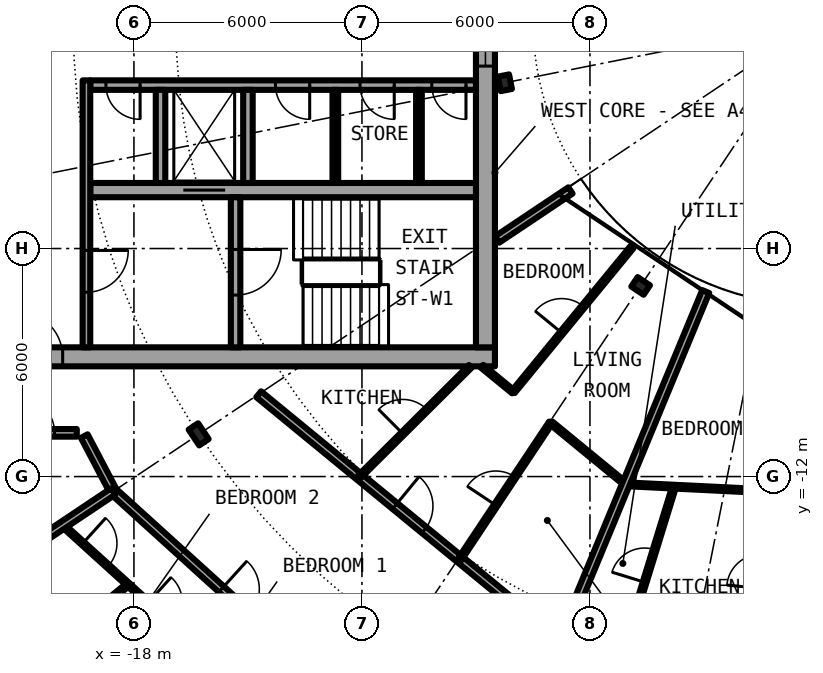
"""IFC4 building model, lengths in metres.
Left out: names, types, materials, properties, quantities, classifications, styles, units other than length and angle.
Written with IfcOpenShell. Run it as: python <this file> out.ifc"""

import sys

from ifc_helpers import new_model, si_unit, direction, frame, frame_2d, origin, origin_2d, place, context, subcontext, project, spatial, rectangle, i_section, extrude, element, fill, save


model = new_model("IFC4")
c1 = context("Model", 3, precision=1e-05, world=origin(), true_north=direction((0.0, 1.0)))
c2 = subcontext(c1, "Body", "Model", "MODEL_VIEW")
j1 = project(units=[si_unit("LENGTHUNIT", "METRE"), si_unit("PLANEANGLEUNIT", "RADIAN")], contexts=[c1])
p1 = place(None, origin())
s1 = spatial("IfcSite", under=j1, at=p1, CompositionType="ELEMENT")
p2 = place(p1, origin())
s2 = spatial("IfcBuilding", under=s1, at=p2, CompositionType="ELEMENT")
p3 = place(p2, frame((0.0, 0.0, 151.3)))
s3 = spatial("IfcBuildingStorey", under=s2, at=p3, CompositionType="ELEMENT", Elevation=151.3)
p4 = place(p3, frame((-16.297, -10.889, 0.0), z_axis=(0.0, 0.0, 1.0), x_axis=(-0.831469612303, -0.55557023302, 0.0)))
e1 = element("IfcColumn", 1, at=p4, inside=s3, PredefinedType="COLUMN", context=c2, shape_type="SweptSolid", body=[
    extrude(i_section(OverallWidth=0.3, OverallDepth=0.5, WebThickness=0.014, FlangeThickness=0.028, FilletRadius=0.027, at=origin_2d()), origin(), (0.0, 0.0, 1.0), 3.05),
])
for number, where, z_axis, x_axis in (
    (2, (-8.239, -1.639, 0.0), (0.0, 0.0, 1.0), (-0.981, -0.195, 0.0)),
    (3, (-4.667, -6.984, 0.0), (0.0, 0.0, 1.0), (-0.556, -0.831, 0.0)),
):
    element("IfcColumn", number, at=place(p3, frame(where, z_axis=z_axis, x_axis=x_axis)), inside=s3, PredefinedType="COLUMN", context=c2, shape_type="SweptSolid", body=[
        extrude(i_section(OverallWidth=0.3, OverallDepth=0.39, WebThickness=0.011, FlangeThickness=0.019, FilletRadius=0.027, at=origin_2d()), origin(), (0.0, 0.0, 1.0), 3.05),
    ])
p5 = place(p3, frame((-22.1, -8.85, 0.0), z_axis=(0.0, 0.0, 1.0), x_axis=(1.0, 0.0, 0.0)))
e4 = element("IfcWall", 4, at=p5, inside=s3, PredefinedType="SHEAR", context=c2, shape_type="SweptSolid", body=[
    extrude(rectangle(XDim=13.6, YDim=0.5, at=frame_2d((6.8, 0.0))), origin(), (0.0, 0.0, 1.0), 3.05),
])
p6 = place(p5, frame((1.025, 0.0, 0.0)))
e5 = element("IfcOpeningElement", 5, at=p6, cuts=e4, PredefinedType="OPENING", context=c2, shape_type="SweptSolid", body=[
    extrude(rectangle(XDim=1.2, YDim=2.3, at=frame_2d((0.6, 1.15))), frame((0.0, 0.26, 0.0), z_axis=(0.0, -1.0, 0.0), x_axis=(1.0, 0.0, 0.0)), (0.0, 0.0, 1.0), 0.52),
])
p7 = place(p3, frame((-8.75, 8.6, 0.0), z_axis=(0.0, 0.0, 1.0), x_axis=(0.0, -1.0, 0.0)))
e6 = element("IfcWall", 6, at=p7, inside=s3, PredefinedType="SHEAR", context=c2, shape_type="SweptSolid", body=[
    extrude(rectangle(XDim=17.2, YDim=0.5, at=frame_2d((8.6, 0.0))), origin(), (0.0, 0.0, 1.0), 3.05),
])
p8 = place(p7, frame((7.4, 0.0, 0.1)))
e7 = element("IfcOpeningElement", 7, at=p8, cuts=e6, PredefinedType="OPENING", context=c2, shape_type="SweptSolid", body=[
    extrude(rectangle(XDim=2.4, YDim=2.2, at=frame_2d((1.2, 1.1))), frame((0.0, 0.26, 0.0), z_axis=(0.0, -1.0, 0.0), x_axis=(1.0, 0.0, 0.0)), (0.0, 0.0, 1.0), 0.52),
])
p9 = place(p3, frame((-9.0, -1.7, 0.0), z_axis=(0.0, 0.0, 1.0), x_axis=(-1.0, 0.0, 0.0)))
e8 = element("IfcWall", 8, at=p9, inside=s3, PredefinedType="SHEAR", context=c2, shape_type="SweptSolid", body=[
    extrude(rectangle(XDim=10.15, YDim=0.25, at=frame_2d((5.075, 0.0))), origin(), (0.0, 0.0, 1.0), 3.05),
])
p10 = place(p9, frame((0.262, 0.0, 0.0)))
e9 = element("IfcOpeningElement", 9, at=p10, cuts=e8, PredefinedType="OPENING", context=c2, shape_type="SweptSolid", body=[
    extrude(rectangle(XDim=0.9, YDim=2.3, at=frame_2d((0.45, 1.15))), frame((0.0, 0.135, 0.0), z_axis=(0.0, -1.0, 0.0), x_axis=(1.0, 0.0, 0.0)), (0.0, 0.0, 1.0), 0.27),
])
p11 = place(p9, frame((2.15, 0.0, 0.0)))
e10 = element("IfcOpeningElement", 10, at=p11, cuts=e8, PredefinedType="OPENING", context=c2, shape_type="SweptSolid", body=[
    extrude(rectangle(XDim=0.9, YDim=2.3, at=frame_2d((0.45, 1.15))), frame((0.0, 0.135, 0.0), z_axis=(0.0, -1.0, 0.0), x_axis=(1.0, 0.0, 0.0)), (0.0, 0.0, 1.0), 0.27),
])
p12 = place(p9, frame((4.375, 0.0, 0.0)))
e11 = element("IfcOpeningElement", 11, at=p12, cuts=e8, PredefinedType="OPENING", context=c2, shape_type="SweptSolid", body=[
    extrude(rectangle(XDim=0.9, YDim=2.3, at=frame_2d((0.45, 1.15))), frame((0.0, 0.135, 0.0), z_axis=(0.0, -1.0, 0.0), x_axis=(1.0, 0.0, 0.0)), (0.0, 0.0, 1.0), 0.27),
])
p13 = place(p9, frame((8.837, 0.0, 0.0)))
e12 = element("IfcOpeningElement", 12, at=p13, cuts=e8, PredefinedType="OPENING", context=c2, shape_type="SweptSolid", body=[
    extrude(rectangle(XDim=0.9, YDim=2.3, at=frame_2d((0.45, 1.15))), frame((0.0, 0.135, 0.0), z_axis=(0.0, -1.0, 0.0), x_axis=(1.0, 0.0, 0.0)), (0.0, 0.0, 1.0), 0.27),
])
p14 = place(p3, frame((-9.0, -4.462, 0.0), z_axis=(0.0, 0.0, 1.0), x_axis=(-1.0, 0.0, 0.0)))
e13 = element("IfcWall", 13, at=p14, inside=s3, PredefinedType="SHEAR", context=c2, shape_type="SweptSolid", body=[
    extrude(rectangle(XDim=10.15, YDim=0.375, at=frame_2d((5.075, 0.0))), origin(), (0.0, 0.0, 1.0), 3.05),
])
p15 = place(p14, frame((6.6, 0.0, 0.0)))
e14 = element("IfcOpeningElement", 14, at=p15, cuts=e13, PredefinedType="OPENING", context=c2, shape_type="SweptSolid", body=[
    extrude(rectangle(XDim=1.1, YDim=2.3, at=frame_2d((0.55, 1.15))), frame((0.0, 0.198, 0.0), z_axis=(0.0, -1.0, 0.0), x_axis=(1.0, 0.0, 0.0)), (0.0, 0.0, 1.0), 0.395),
])
p16 = place(p3, frame((-15.325, -4.65, 0.0), z_axis=(0.0, 0.0, 1.0), x_axis=(0.0, -1.0, 0.0)))
e15 = element("IfcWall", 15, at=p16, inside=s3, PredefinedType="SHEAR", context=c2, shape_type="SweptSolid", body=[
    extrude(rectangle(XDim=3.95, YDim=0.25, at=frame_2d((1.975, 0.0))), origin(), (0.0, 0.0, 1.0), 3.05),
])
p17 = place(p16, frame((1.375, 0.0, 0.0)))
e16 = element("IfcOpeningElement", 16, at=p17, cuts=e15, PredefinedType="OPENING", context=c2, shape_type="SweptSolid", body=[
    extrude(rectangle(XDim=1.2, YDim=2.3, at=frame_2d((0.6, 1.15))), frame((0.0, 0.135, 0.0), z_axis=(0.0, -1.0, 0.0), x_axis=(1.0, 0.0, 0.0)), (0.0, 0.0, 1.0), 0.27),
])
for number, where, z_axis, x_axis in (
    (17, (-15.0, -1.825, 0.0), (0.0, 0.0, 1.0), (0.0, -1.0, 0.0)),
    (18, (-17.3, -1.825, 0.0), (0.0, 0.0, 1.0), (0.0, -1.0, 0.0)),
):
    element("IfcWall", number, at=place(p3, frame(where, z_axis=z_axis, x_axis=x_axis)), inside=s3, PredefinedType="SOLIDWALL", context=c2, shape_type="SweptSolid", body=[
        extrude(rectangle(XDim=2.45, YDim=0.25, at=frame_2d((1.225, 0.0))), origin(), (0.0, 0.0, 1.0), 2.7),
    ])
p18 = place(p3, frame((-19.25, -1.575, 0.0), z_axis=(0.0, 0.0, 1.0), x_axis=(0.0, -1.0, 0.0)))
e19 = element("IfcWall", 19, at=p18, inside=s3, PredefinedType="SOLIDWALL", context=c2, shape_type="SweptSolid", body=[
    extrude(rectangle(XDim=7.025, YDim=0.2, at=frame_2d((3.513, 0.0))), origin(), (0.0, 0.0, 1.0), 2.7),
])
p19 = place(p18, frame((4.475, 0.0, 0.0)))
e20 = element("IfcOpeningElement", 20, at=p19, cuts=e19, PredefinedType="OPENING", context=c2, shape_type="SweptSolid", body=[
    extrude(rectangle(XDim=1.1, YDim=2.3, at=frame_2d((0.55, 1.15))), frame((0.0, 0.11, 0.0), z_axis=(0.0, -1.0, 0.0), x_axis=(1.0, 0.0, 0.0)), (0.0, 0.0, 1.0), 0.22),
])
for number, where, z_axis, x_axis in (
    (21, (-10.5, -1.825, 0.0), (0.0, 0.0, 1.0), (0.0, -1.0, 0.0)),
    (22, (-12.7, -1.825, 0.0), (0.0, 0.0, 1.0), (0.0, -1.0, 0.0)),
):
    element("IfcWall", number, at=place(p3, frame(where, z_axis=z_axis, x_axis=x_axis)), inside=s3, PredefinedType="PARTITIONING", context=c2, shape_type="SweptSolid", body=[
        extrude(rectangle(XDim=2.45, YDim=0.15, at=frame_2d((1.225, 0.0))), origin(), (0.0, 0.0, 1.0), 2.7),
    ])
p20 = place(p3, frame((-19.869, -13.284, 0.0), z_axis=(0.0, 0.0, 1.0), x_axis=(0.741104058203, -0.67139018083, 0.0)))
e23 = element("IfcWall", 23, at=p20, inside=s3, PredefinedType="PARTITIONING", context=c2, shape_type="SweptSolid", body=[
    extrude(rectangle(XDim=6.969, YDim=0.1, at=frame_2d((3.484, 0.0))), origin(), (0.0, 0.0, 1.0), 2.7),
])
p21 = place(p20, frame((3.028, 0.0, 0.0)))
e24 = element("IfcOpeningElement", 24, at=p21, cuts=e23, PredefinedType="OPENING", context=c2, shape_type="SweptSolid", body=[
    extrude(rectangle(XDim=0.9, YDim=2.3, at=frame_2d((0.45, 1.15))), frame((0.0, 0.06, 0.0), z_axis=(0.0, -1.0, 0.0), x_axis=(1.0, 0.0, 0.0)), (0.0, 0.0, 1.0), 0.12),
])
p22 = place(p20, frame((0.705, 0.0, 0.0)))
e25 = element("IfcOpeningElement", 25, at=p22, cuts=e23, PredefinedType="OPENING", context=c2, shape_type="SweptSolid", body=[
    extrude(rectangle(XDim=0.9, YDim=2.3, at=frame_2d((0.45, 1.15))), frame((0.0, 0.06, 0.0), z_axis=(0.0, -1.0, 0.0), x_axis=(1.0, 0.0, 0.0)), (0.0, 0.0, 1.0), 0.12),
])
p23 = place(p3, frame((-19.307, -10.935, 0.0), z_axis=(0.0, 0.0, 1.0), x_axis=(0.465605550524, -0.884992356646, 0.0)))
e26 = element("IfcWall", 26, at=p23, inside=s3, PredefinedType="PARTITIONING", context=c2, shape_type="SweptSolid", body=[
    extrude(rectangle(XDim=1.643, YDim=0.2, at=frame_2d((0.821, 0.0))), origin(), (0.0, 0.0, 1.0), 2.7),
])
p24 = place(p3, frame((-18.542, -12.389, 0.0), z_axis=(0.0, 0.0, 1.0), x_axis=(0.740979597636, -0.671527539188, 0.0)))
e27 = element("IfcWall", 27, at=p24, inside=s3, PredefinedType="PARTITIONING", context=c2, shape_type="SweptSolid", body=[
    extrude(rectangle(XDim=10.841, YDim=0.2, at=frame_2d((5.42, 0.0))), origin(), (0.0, 0.0, 1.0), 2.7),
])
p25 = place(p24, frame((3.835, 0.0, 0.0)))
e28 = element("IfcOpeningElement", 28, at=p25, cuts=e27, PredefinedType="OPENING", context=c2, shape_type="SweptSolid", body=[
    extrude(rectangle(XDim=1.0, YDim=2.3, at=frame_2d((0.5, 1.15))), frame((0.0, 0.11, 0.0), z_axis=(0.0, -1.0, 0.0), x_axis=(1.0, 0.0, 0.0)), (0.0, 0.0, 1.0), 0.22),
])
p26 = place(p3, frame((-14.717, -9.834, 0.0), z_axis=(0.0, 0.0, 1.0), x_axis=(0.773034536097, -0.634363938131, 0.0)))
e29 = element("IfcWall", 29, at=p26, inside=s3, PredefinedType="PARTITIONING", context=c2, shape_type="SweptSolid", body=[
    extrude(rectangle(XDim=10.277, YDim=0.2, at=frame_2d((5.138, 0.0))), origin(), (0.0, 0.0, 1.0), 2.7),
])
p27 = place(p26, frame((4.638, 0.0, 0.0)))
e30 = element("IfcOpeningElement", 30, at=p27, cuts=e29, PredefinedType="OPENING", context=c2, shape_type="SweptSolid", body=[
    extrude(rectangle(XDim=1.0, YDim=2.3, at=frame_2d((0.5, 1.15))), frame((0.0, 0.11, 0.0), z_axis=(0.0, -1.0, 0.0), x_axis=(1.0, 0.0, 0.0)), (0.0, 0.0, 1.0), 0.22),
])
p28 = place(p3, frame((-8.839, -9.098, 0.0), z_axis=(0.0, 0.0, 1.0), x_axis=(0.7731800648, -0.634186555673, 0.0)))
e31 = element("IfcWall", 31, at=p28, inside=s3, PredefinedType="PARTITIONING", context=c2, shape_type="SweptSolid", body=[
    extrude(rectangle(XDim=1.064, YDim=0.1, at=frame_2d((0.532, 0.0))), origin(), (0.0, 0.0, 1.0), 2.7),
])
p29 = place(p3, frame((-7.031, -10.582, 0.0), z_axis=(0.0, 0.0, 1.0), x_axis=(0.772943675046, -0.634474645046, 0.0)))
e32 = element("IfcWall", 32, at=p29, inside=s3, PredefinedType="PARTITIONING", context=c2, shape_type="SweptSolid", body=[
    extrude(rectangle(XDim=2.557, YDim=0.1, at=frame_2d((1.278, 0.0))), origin(), (0.0, 0.0, 1.0), 2.7),
])
p30 = place(p3, frame((-5.06, -12.203, 0.0), z_axis=(0.0, 0.0, 1.0), x_axis=(0.998784958727, -0.049280891026, 0.0)))
e33 = element("IfcWall", 33, at=p30, inside=s3, PredefinedType="PARTITIONING", context=c2, shape_type="SweptSolid", body=[
    extrude(rectangle(XDim=3.82, YDim=0.1, at=frame_2d((1.91, 0.0))), origin(), (0.0, 0.0, 1.0), 2.7),
])
p31 = place(p3, frame((-21.675, -10.85, 0.0), z_axis=(0.0, 0.0, 1.0), x_axis=(1.0, 0.0, 0.0)))
e34 = element("IfcWall", 34, at=p31, inside=s3, PredefinedType="PARTITIONING", context=c2, shape_type="SweptSolid", body=[
    extrude(rectangle(XDim=2.171, YDim=0.2, at=frame_2d((1.085, 0.0))), origin(), (0.0, 0.0, 1.0), 2.7),
])
p32 = place(p31, frame((0.585, 0.0, 0.0)))
e35 = element("IfcOpeningElement", 35, at=p32, cuts=e34, PredefinedType="OPENING", context=c2, shape_type="SweptSolid", body=[
    extrude(rectangle(XDim=1.0, YDim=2.3, at=frame_2d((0.5, 1.15))), frame((0.0, 0.11, 0.0), z_axis=(0.0, -1.0, 0.0), x_axis=(1.0, 0.0, 0.0)), (0.0, 0.0, 1.0), 0.22),
])
p33 = place(p3, frame((-6.513, -4.472, 0.0), z_axis=(0.0, 0.0, 1.0), x_axis=(-0.83133816625, -0.555766905579, 0.0)))
e36 = element("IfcWall", 36, at=p33, inside=s3, PredefinedType="PARTITIONING", context=c2, shape_type="SweptSolid", body=[
    extrude(rectangle(XDim=2.323, YDim=0.2, at=frame_2d((1.162, 0.0))), origin(), (0.0, 0.0, 1.0), 2.7),
])
p34 = place(p3, frame((-22.595, -15.098, 0.0), z_axis=(0.0, 0.0, 1.0), x_axis=(0.831387096605, 0.55569370664, 0.0)))
e37 = element("IfcWall", 37, at=p34, inside=s3, PredefinedType="PARTITIONING", context=c2, shape_type="SweptSolid", body=[
    extrude(rectangle(XDim=4.875, YDim=0.2, at=frame_2d((2.438, 0.0))), origin(), (0.0, 0.0, 1.0), 2.7),
])
p35 = place(p3, frame((-21.04, -17.199, 0.0), z_axis=(0.0, 0.0, 1.0), x_axis=(0.774321581607, 0.63279229472, 0.0)))
e38 = element("IfcWall", 38, at=p35, inside=s3, PredefinedType="PARTITIONING", context=c2, shape_type="SweptSolid", body=[
    extrude(rectangle(XDim=3.731, YDim=0.1, at=frame_2d((1.866, 0.0))), origin(), (0.0, 0.0, 1.0), 2.7),
])
p36 = place(p3, frame((-12.069, -12.007, 0.0), z_axis=(0.0, 0.0, 1.0), x_axis=(0.708822693149, 0.705386695138, 0.0)))
e39 = element("IfcWall", 39, at=p36, inside=s3, PredefinedType="PARTITIONING", context=c2, shape_type="SweptSolid", body=[
    extrude(rectangle(XDim=4.121, YDim=0.1, at=frame_2d((2.061, 0.0))), origin(), (0.0, 0.0, 1.0), 2.7),
])
p37 = place(p36, frame((1.611, 0.0, 0.0)))
e40 = element("IfcOpeningElement", 40, at=p37, cuts=e39, PredefinedType="OPENING", context=c2, shape_type="SweptSolid", body=[
    extrude(rectangle(XDim=0.9, YDim=2.3, at=frame_2d((0.45, 1.15))), frame((0.0, 0.06, 0.0), z_axis=(0.0, -1.0, 0.0), x_axis=(1.0, 0.0, 0.0)), (0.0, 0.0, 1.0), 0.12),
])
p38 = place(p3, frame((-9.425, -14.177, 0.0), z_axis=(0.0, 0.0, 1.0), x_axis=(0.553865036342, 0.832606462573, 0.0)))
e41 = element("IfcWall", 41, at=p38, inside=s3, PredefinedType="PARTITIONING", context=c2, shape_type="SweptSolid", body=[
    extrude(rectangle(XDim=4.319, YDim=0.1, at=frame_2d((2.159, 0.0))), origin(), (0.0, 0.0, 1.0), 2.7),
])
p39 = place(p38, frame((1.709, 0.0, 0.0)))
e42 = element("IfcOpeningElement", 42, at=p39, cuts=e41, PredefinedType="OPENING", context=c2, shape_type="SweptSolid", body=[
    extrude(rectangle(XDim=0.9, YDim=2.3, at=frame_2d((0.45, 1.15))), frame((0.0, 0.06, 0.0), z_axis=(0.0, -1.0, 0.0), x_axis=(1.0, 0.0, 0.0)), (0.0, 0.0, 1.0), 0.12),
])
p40 = place(p3, frame((-8.019, -9.771, 0.0), z_axis=(0.0, 0.0, 1.0), x_axis=(0.634401778971, 0.773003481776, 0.0)))
e43 = element("IfcWall", 43, at=p40, inside=s3, PredefinedType="PARTITIONING", context=c2, shape_type="SweptSolid", body=[
    extrude(rectangle(XDim=4.92, YDim=0.1, at=frame_2d((2.46, 0.0))), origin(), (0.0, 0.0, 1.0), 2.7),
])
p41 = place(p40, frame((2.01, 0.0, 0.0)))
e44 = element("IfcOpeningElement", 44, at=p41, cuts=e43, PredefinedType="OPENING", context=c2, shape_type="SweptSolid", body=[
    extrude(rectangle(XDim=0.9, YDim=2.3, at=frame_2d((0.45, 1.15))), frame((0.0, 0.06, 0.0), z_axis=(0.0, -1.0, 0.0), x_axis=(1.0, 0.0, 0.0)), (0.0, 0.0, 1.0), 0.12),
])
p42 = place(p3, frame((-6.774, -16.353, 0.0), z_axis=(0.0, 0.0, 1.0), x_axis=(0.382716169203, 0.92386597179, 0.0)))
e45 = element("IfcWall", 45, at=p42, inside=s3, PredefinedType="PARTITIONING", context=c2, shape_type="SweptSolid", body=[
    extrude(rectangle(XDim=9.981, YDim=0.2, at=frame_2d((4.99, 0.0))), origin(), (0.0, 0.0, 1.0), 2.7),
])
p43 = place(p3, frame((-5.072, -16.436, 0.0), z_axis=(0.0, 0.0, 1.0), x_axis=(0.294934866503, 0.955517359612, 0.0)))
e46 = element("IfcWall", 46, at=p43, inside=s3, PredefinedType="PARTITIONING", context=c2, shape_type="SweptSolid", body=[
    extrude(rectangle(XDim=4.364, YDim=0.1, at=frame_2d((2.182, 0.0))), origin(), (0.0, 0.0, 1.0), 2.7),
])
p44 = place(p43, frame((1.732, 0.0, 0.0)))
e47 = element("IfcOpeningElement", 47, at=p44, cuts=e46, PredefinedType="OPENING", context=c2, shape_type="SweptSolid", body=[
    extrude(rectangle(XDim=0.9, YDim=2.3, at=frame_2d((0.45, 1.15))), frame((0.0, 0.06, 0.0), z_axis=(0.0, -1.0, 0.0), x_axis=(1.0, 0.0, 0.0)), (0.0, 0.0, 1.0), 0.12),
])
p45 = place(p15, origin())
e48 = element("IfcDoor", 48, at=p45, inside=s3, OperationType="DOUBLE_DOOR_SLIDING", PredefinedType="DOOR", context=c2, shape_type="SweptSolid", body=[
    extrude(rectangle(XDim=1.1, YDim=2.3, at=frame_2d((0.55, 1.15))), frame((0.0, 0.025, 0.0), z_axis=(0.0, -1.0, 0.0), x_axis=(1.0, 0.0, 0.0)), (0.0, 0.0, 1.0), 0.05),
])
fill(e14, e48)
p46 = place(p10, origin())
e49 = element("IfcDoor", 49, at=p46, inside=s3, OperationType="SINGLE_SWING_RIGHT", PredefinedType="DOOR", context=c2, shape_type="SweptSolid", body=[
    extrude(rectangle(XDim=0.9, YDim=2.3, at=frame_2d((0.45, 1.15))), frame((0.0, 0.025, 0.0), z_axis=(0.0, -1.0, 0.0), x_axis=(1.0, 0.0, 0.0)), (0.0, 0.0, 1.0), 0.05),
])
fill(e9, e49)
p47 = place(p11, origin())
e50 = element("IfcDoor", 50, at=p47, inside=s3, OperationType="SINGLE_SWING_RIGHT", PredefinedType="DOOR", context=c2, shape_type="SweptSolid", body=[
    extrude(rectangle(XDim=0.9, YDim=2.3, at=frame_2d((0.45, 1.15))), frame((0.0, 0.025, 0.0), z_axis=(0.0, -1.0, 0.0), x_axis=(1.0, 0.0, 0.0)), (0.0, 0.0, 1.0), 0.05),
])
fill(e10, e50)
p48 = place(p12, origin())
e51 = element("IfcDoor", 51, at=p48, inside=s3, OperationType="SINGLE_SWING_RIGHT", PredefinedType="DOOR", context=c2, shape_type="SweptSolid", body=[
    extrude(rectangle(XDim=0.9, YDim=2.3, at=frame_2d((0.45, 1.15))), frame((0.0, 0.025, 0.0), z_axis=(0.0, -1.0, 0.0), x_axis=(1.0, 0.0, 0.0)), (0.0, 0.0, 1.0), 0.05),
])
fill(e11, e51)
p49 = place(p13, origin())
e52 = element("IfcDoor", 52, at=p49, inside=s3, OperationType="SINGLE_SWING_LEFT", PredefinedType="DOOR", context=c2, shape_type="SweptSolid", body=[
    extrude(rectangle(XDim=0.9, YDim=2.3, at=frame_2d((0.45, 1.15))), frame((0.0, 0.025, 0.0), z_axis=(0.0, -1.0, 0.0), x_axis=(1.0, 0.0, 0.0)), (0.0, 0.0, 1.0), 0.05),
])
fill(e12, e52)
p50 = place(p17, origin())
e53 = element("IfcDoor", 53, at=p50, inside=s3, OperationType="SINGLE_SWING_LEFT", PredefinedType="DOOR", context=c2, shape_type="SweptSolid", body=[
    extrude(rectangle(XDim=1.2, YDim=2.3, at=frame_2d((0.6, 1.15))), frame((0.0, 0.025, 0.0), z_axis=(0.0, -1.0, 0.0), x_axis=(1.0, 0.0, 0.0)), (0.0, 0.0, 1.0), 0.05),
])
fill(e16, e53)
p51 = place(p19, origin())
e54 = element("IfcDoor", 54, at=p51, inside=s3, OperationType="SINGLE_SWING_LEFT", PredefinedType="DOOR", context=c2, shape_type="SweptSolid", body=[
    extrude(rectangle(XDim=1.1, YDim=2.3, at=frame_2d((0.55, 1.15))), frame((0.0, 0.025, 0.0), z_axis=(0.0, -1.0, 0.0), x_axis=(1.0, 0.0, 0.0)), (0.0, 0.0, 1.0), 0.05),
])
fill(e20, e54)
p52 = place(p6, origin())
e55 = element("IfcDoor", 55, at=p52, inside=s3, OperationType="SINGLE_SWING_RIGHT", PredefinedType="DOOR", context=c2, shape_type="SweptSolid", body=[
    extrude(rectangle(XDim=1.2, YDim=2.3, at=frame_2d((0.6, 1.15))), frame((0.0, 0.025, 0.0), z_axis=(0.0, -1.0, 0.0), x_axis=(1.0, 0.0, 0.0)), (0.0, 0.0, 1.0), 0.05),
])
fill(e5, e55)
p53 = place(p8, origin())
e56 = element("IfcWindow", 56, at=p53, inside=s3, PartitioningType="SINGLE_PANEL", PredefinedType="WINDOW", context=c2, shape_type="SweptSolid", body=[
    extrude(rectangle(XDim=2.4, YDim=2.2, at=frame_2d((1.2, 1.1))), frame((0.0, 0.03, 0.0), z_axis=(0.0, -1.0, 0.0), x_axis=(1.0, 0.0, 0.0)), (0.0, 0.0, 1.0), 0.06),
])
fill(e7, e56)
p54 = place(p25, origin())
e57 = element("IfcDoor", 57, at=p54, inside=s3, OperationType="SINGLE_SWING_LEFT", PredefinedType="DOOR", context=c2, shape_type="SweptSolid", body=[
    extrude(rectangle(XDim=1.0, YDim=2.3, at=frame_2d((0.5, 1.15))), frame((0.0, 0.025, 0.0), z_axis=(0.0, -1.0, 0.0), x_axis=(1.0, 0.0, 0.0)), (0.0, 0.0, 1.0), 0.05),
])
fill(e28, e57)
p55 = place(p22, origin())
e58 = element("IfcDoor", 58, at=p55, inside=s3, OperationType="SINGLE_SWING_LEFT", PredefinedType="DOOR", context=c2, shape_type="SweptSolid", body=[
    extrude(rectangle(XDim=0.9, YDim=2.3, at=frame_2d((0.45, 1.15))), frame((0.0, 0.025, 0.0), z_axis=(0.0, -1.0, 0.0), x_axis=(1.0, 0.0, 0.0)), (0.0, 0.0, 1.0), 0.05),
])
fill(e25, e58)
p56 = place(p27, origin())
e59 = element("IfcDoor", 59, at=p56, inside=s3, OperationType="SINGLE_SWING_LEFT", PredefinedType="DOOR", context=c2, shape_type="SweptSolid", body=[
    extrude(rectangle(XDim=1.0, YDim=2.3, at=frame_2d((0.5, 1.15))), frame((0.0, 0.025, 0.0), z_axis=(0.0, -1.0, 0.0), x_axis=(1.0, 0.0, 0.0)), (0.0, 0.0, 1.0), 0.05),
])
fill(e30, e59)
p57 = place(p39, origin())
e60 = element("IfcDoor", 60, at=p57, inside=s3, OperationType="SINGLE_SWING_LEFT", PredefinedType="DOOR", context=c2, shape_type="SweptSolid", body=[
    extrude(rectangle(XDim=0.9, YDim=2.3, at=frame_2d((0.45, 1.15))), frame((0.0, 0.025, 0.0), z_axis=(0.0, -1.0, 0.0), x_axis=(1.0, 0.0, 0.0)), (0.0, 0.0, 1.0), 0.05),
])
fill(e42, e60)
p58 = place(p37, origin())
e61 = element("IfcDoor", 61, at=p58, inside=s3, OperationType="SINGLE_SWING_RIGHT", PredefinedType="DOOR", context=c2, shape_type="SweptSolid", body=[
    extrude(rectangle(XDim=0.9, YDim=2.3, at=frame_2d((0.45, 1.15))), frame((0.0, 0.025, 0.0), z_axis=(0.0, -1.0, 0.0), x_axis=(1.0, 0.0, 0.0)), (0.0, 0.0, 1.0), 0.05),
])
fill(e40, e61)
p59 = place(p41, origin())
e62 = element("IfcDoor", 62, at=p59, inside=s3, OperationType="SINGLE_SWING_LEFT", PredefinedType="DOOR", context=c2, shape_type="SweptSolid", body=[
    extrude(rectangle(XDim=0.9, YDim=2.3, at=frame_2d((0.45, 1.15))), frame((0.0, 0.025, 0.0), z_axis=(0.0, -1.0, 0.0), x_axis=(1.0, 0.0, 0.0)), (0.0, 0.0, 1.0), 0.05),
])
fill(e44, e62)
p60 = place(p44, origin())
e63 = element("IfcDoor", 63, at=p60, inside=s3, OperationType="SINGLE_SWING_RIGHT", PredefinedType="DOOR", context=c2, shape_type="SweptSolid", body=[
    extrude(rectangle(XDim=0.9, YDim=2.3, at=frame_2d((0.45, 1.15))), frame((0.0, 0.025, 0.0), z_axis=(0.0, -1.0, 0.0), x_axis=(1.0, 0.0, 0.0)), (0.0, 0.0, 1.0), 0.05),
])
fill(e47, e63)
p61 = place(p32, origin())
e64 = element("IfcDoor", 64, at=p61, inside=s3, OperationType="SINGLE_SWING_LEFT", PredefinedType="DOOR", context=c2, shape_type="SweptSolid", body=[
    extrude(rectangle(XDim=1.0, YDim=2.3, at=frame_2d((0.5, 1.15))), frame((0.0, 0.025, 0.0), z_axis=(0.0, -1.0, 0.0), x_axis=(1.0, 0.0, 0.0)), (0.0, 0.0, 1.0), 0.05),
])
fill(e35, e64)
save(model, sys.argv[1])
